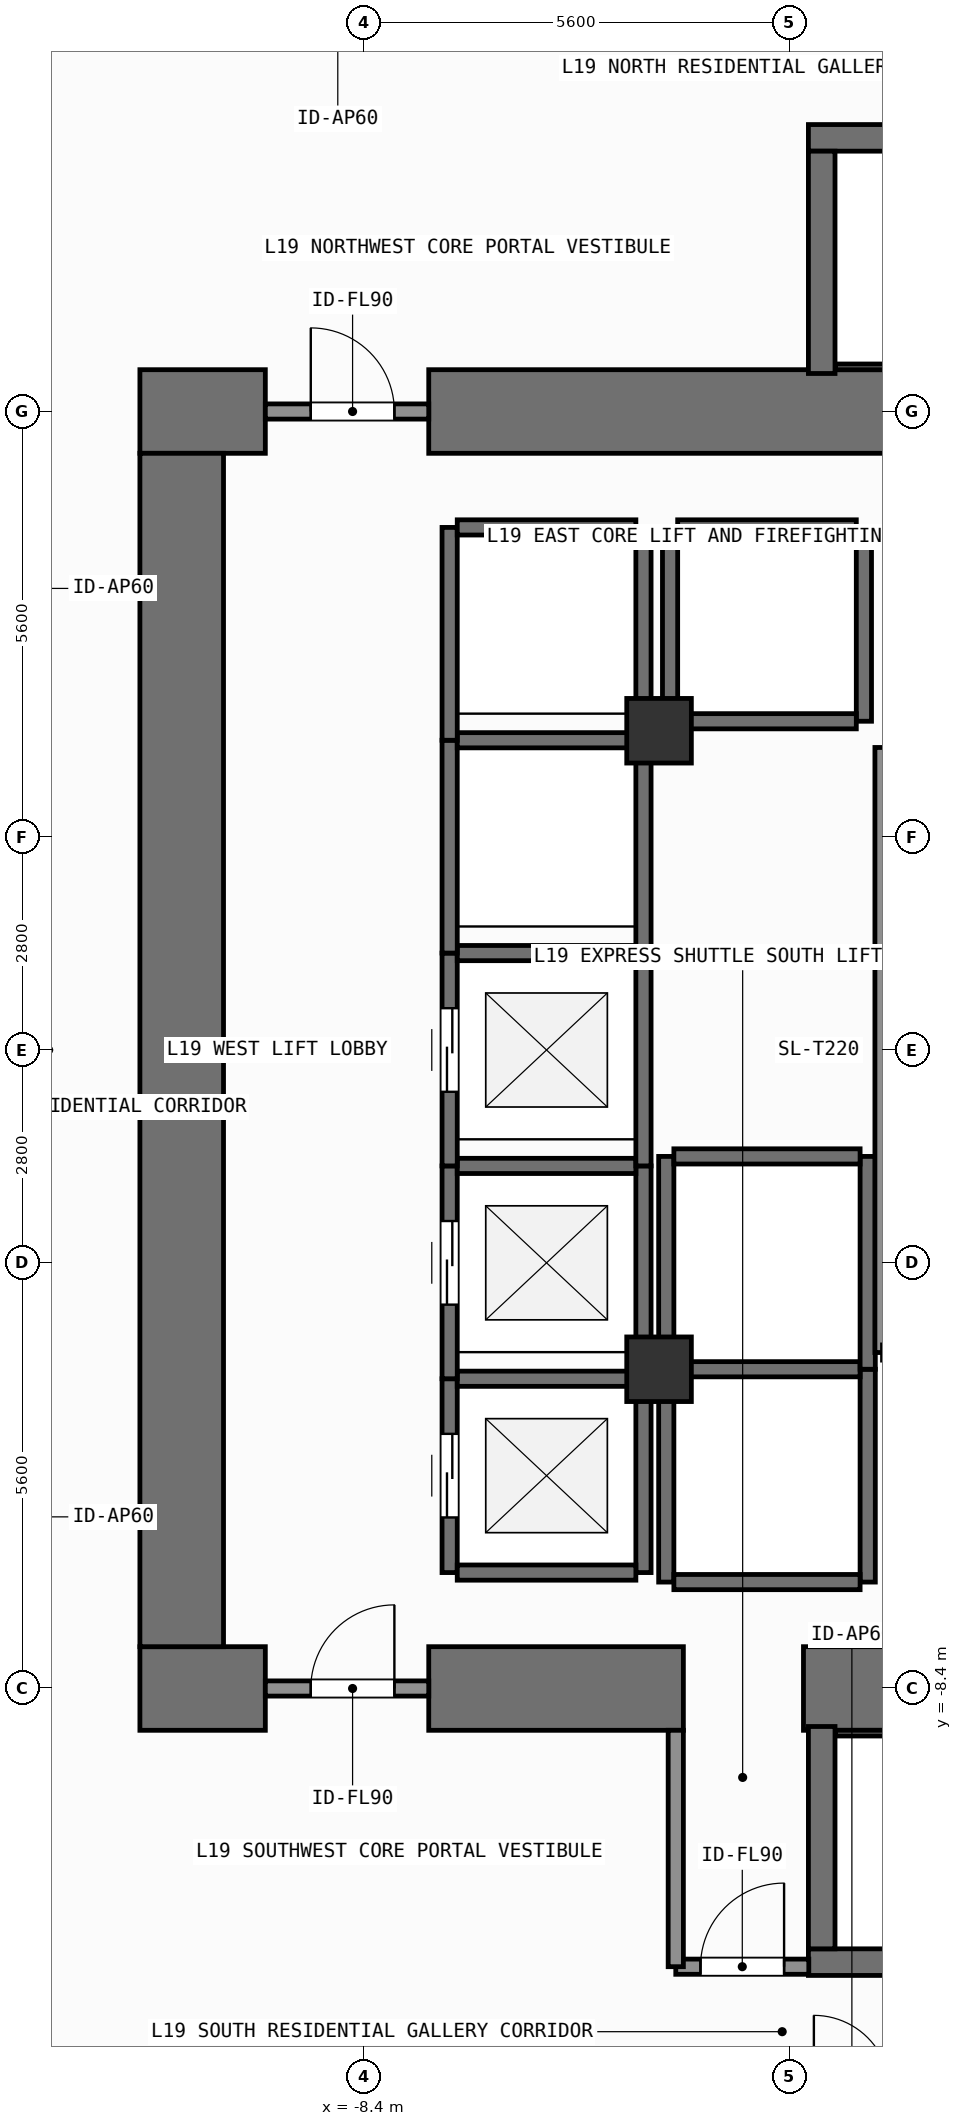
"""IFC4 building model, lengths in metres.
Left out: names, types, materials, properties, quantities, classifications, styles, units other than length and angle.
Written with IfcOpenShell. Run it as: python <this file> out.ifc"""

import sys

from ifc_helpers import new_model, si_unit, direction, frame, frame_2d, origin, origin_2d, place, context, subcontext, project, spatial, rectangle, extrude, element, fill, save


model = new_model("IFC4")
c1 = context("Model", 3, precision=1e-05, world=origin(), true_north=direction((0.0, 1.0)))
c2 = subcontext(c1, "Body", "Model", "MODEL_VIEW")
j1 = project(units=[si_unit("LENGTHUNIT", "METRE"), si_unit("PLANEANGLEUNIT", "RADIAN")], contexts=[c1])
p1 = place(None, origin())
s1 = spatial("IfcSite", under=j1, at=p1, CompositionType="ELEMENT")
p2 = place(p1, origin())
s2 = spatial("IfcBuilding", under=s1, at=p2, CompositionType="ELEMENT")
p3 = place(p2, frame((0.0, 0.0, 73.5)))
s3 = spatial("IfcBuildingStorey", under=s2, at=p3, CompositionType="ELEMENT", Elevation=73.5)
p4 = place(p3, frame((-11.35, -8.4, 0.0), z_axis=(0.0, 0.0, 1.0), x_axis=(1.0, 0.0, 0.0)))
e1 = element("IfcWall", 1, at=p4, inside=s3, PredefinedType="SHEAR", context=c2, shape_type="SweptSolid", body=[
    extrude(rectangle(XDim=1.65, YDim=1.1, at=frame_2d((0.825, 0.0))), origin(), (0.0, 0.0, 1.0), 3.9),
])
p5 = place(p3, frame((-7.55, -8.4, 0.0), z_axis=(0.0, 0.0, 1.0), x_axis=(1.0, 0.0, 0.0)))
e2 = element("IfcWall", 2, at=p5, inside=s3, PredefinedType="SHEAR", context=c2, shape_type="SweptSolid", body=[
    extrude(rectangle(XDim=3.35, YDim=1.1, at=frame_2d((1.675, 0.0))), origin(), (0.0, 0.0, 1.0), 3.9),
])
p6 = place(p3, frame((-2.62, -8.4, 0.0), z_axis=(0.0, 0.0, 1.0), x_axis=(1.0, 0.0, 0.0)))
e3 = element("IfcWall", 3, at=p6, inside=s3, PredefinedType="SHEAR", context=c2, shape_type="SweptSolid", body=[
    extrude(rectangle(XDim=7.27, YDim=1.1, at=frame_2d((3.635, 0.0))), origin(), (0.0, 0.0, 1.0), 3.9),
])
p7 = place(p3, frame((-11.35, 8.4, 0.0), z_axis=(0.0, 0.0, 1.0), x_axis=(1.0, 0.0, 0.0)))
e4 = element("IfcWall", 4, at=p7, inside=s3, PredefinedType="SHEAR", context=c2, shape_type="SweptSolid", body=[
    extrude(rectangle(XDim=1.65, YDim=1.1, at=frame_2d((0.825, 0.0))), origin(), (0.0, 0.0, 1.0), 3.9),
])
p8 = place(p3, frame((-7.55, 8.4, 0.0), z_axis=(0.0, 0.0, 1.0), x_axis=(1.0, 0.0, 0.0)))
e5 = element("IfcWall", 5, at=p8, inside=s3, PredefinedType="SHEAR", context=c2, shape_type="SweptSolid", body=[
    extrude(rectangle(XDim=16.5, YDim=1.1, at=frame_2d((8.25, 0.0))), origin(), (0.0, 0.0, 1.0), 3.9),
])
p9 = place(p3, frame((-10.8, -7.85, 0.0), z_axis=(0.0, 0.0, 1.0), x_axis=(0.0, 1.0, 0.0)))
e6 = element("IfcWall", 6, at=p9, inside=s3, PredefinedType="SHEAR", context=c2, shape_type="SweptSolid", body=[
    extrude(rectangle(XDim=15.7, YDim=1.1, at=frame_2d((7.85, 0.0))), origin(), (0.0, 0.0, 1.0), 3.9),
])
p10 = place(p3, frame((-2.555, -12.0, 0.0), z_axis=(0.0, 0.0, 1.0), x_axis=(1.0, 0.0, 0.0)))
e7 = element("IfcWall", 7, at=p10, inside=s3, PredefinedType="SHEAR", context=c2, shape_type="SweptSolid", body=[
    extrude(rectangle(XDim=7.31, YDim=0.35, at=frame_2d((3.655, 0.0))), origin(), (0.0, 0.0, 1.0), 3.9),
])
p11 = place(p3, frame((-2.2, -8.988, 0.0), z_axis=(0.0, 0.0, 1.0), x_axis=(1.0, 0.0, 0.0)))
e8 = element("IfcWall", 8, at=p11, inside=s3, PredefinedType="SHEAR", context=c2, shape_type="SweptSolid", body=[
    extrude(rectangle(XDim=6.6, YDim=0.075, at=frame_2d((3.3, 0.0))), origin(), (0.0, 0.0, 1.0), 3.9),
])
p12 = place(p3, frame((-2.38, -11.825, 0.0), z_axis=(0.0, 0.0, 1.0), x_axis=(0.0, 1.0, 0.0)))
e9 = element("IfcWall", 9, at=p12, inside=s3, PredefinedType="SHEAR", context=c2, shape_type="SweptSolid", body=[
    extrude(rectangle(XDim=2.925, YDim=0.35, at=frame_2d((1.462, 0.0))), origin(), (0.0, 0.0, 1.0), 3.9),
])
p13 = place(p3, frame((-2.555, 12.0, 0.0), z_axis=(0.0, 0.0, 1.0), x_axis=(1.0, 0.0, 0.0)))
e10 = element("IfcWall", 10, at=p13, inside=s3, PredefinedType="SHEAR", context=c2, shape_type="SweptSolid", body=[
    extrude(rectangle(XDim=7.31, YDim=0.35, at=frame_2d((3.655, 0.0))), origin(), (0.0, 0.0, 1.0), 3.9),
])
p14 = place(p3, frame((-2.2, 8.988, 0.0), z_axis=(0.0, 0.0, 1.0), x_axis=(1.0, 0.0, 0.0)))
e11 = element("IfcWall", 11, at=p14, inside=s3, PredefinedType="SHEAR", context=c2, shape_type="SweptSolid", body=[
    extrude(rectangle(XDim=6.6, YDim=0.075, at=frame_2d((3.3, 0.0))), origin(), (0.0, 0.0, 1.0), 3.9),
])
p15 = place(p3, frame((-2.38, 8.9, 0.0), z_axis=(0.0, 0.0, 1.0), x_axis=(0.0, 1.0, 0.0)))
e12 = element("IfcWall", 12, at=p15, inside=s3, PredefinedType="SHEAR", context=c2, shape_type="SweptSolid", body=[
    extrude(rectangle(XDim=2.925, YDim=0.35, at=frame_2d((1.462, 0.0))), origin(), (0.0, 0.0, 1.0), 3.9),
])
for number, where, z_axis, x_axis in (
    (13, (-4.52, -4.2, 0.0), (0.0, 0.0, 1.0), (1.0, 0.0, 0.0)),
    (14, (-4.52, 4.2, 0.0), (0.0, 0.0, 1.0), (1.0, 0.0, 0.0)),
):
    element("IfcColumn", number, at=place(p3, frame(where, z_axis=z_axis, x_axis=x_axis)), inside=s3, PredefinedType="COLUMN", context=c2, shape_type="SweptSolid", body=[
        extrude(rectangle(XDim=0.85, YDim=0.85, at=origin_2d()), origin(), (0.0, 0.0, 1.0), 3.9),
    ])
p16 = place(p3, frame((-7.275, -6.875, 0.0), z_axis=(0.0, 0.0, 1.0), x_axis=(0.0, 1.0, 0.0)))
e15 = element("IfcWall", 15, at=p16, inside=s3, PredefinedType="SHEAR", context=c2, shape_type="SweptSolid", body=[
    extrude(rectangle(XDim=2.55, YDim=0.2, at=frame_2d((1.275, 0.0))), origin(), (0.0, 0.0, 1.0), 3.6),
])
p17 = place(p16, frame((0.725, 0.0, 0.0)))
e16 = element("IfcOpeningElement", 16, at=p17, cuts=e15, PredefinedType="OPENING", context=c2, shape_type="SweptSolid", body=[
    extrude(rectangle(XDim=1.1, YDim=2.2, at=frame_2d((0.55, 1.1))), frame((0.0, 0.11, 0.0), z_axis=(0.0, -1.0, 0.0), x_axis=(1.0, 0.0, 0.0)), (0.0, 0.0, 1.0), 0.22),
])
p18 = place(p3, frame((-4.725, -6.875, 0.0), z_axis=(0.0, 0.0, 1.0), x_axis=(0.0, 1.0, 0.0)))
e17 = element("IfcWall", 17, at=p18, inside=s3, PredefinedType="SHEAR", context=c2, shape_type="SweptSolid", body=[
    extrude(rectangle(XDim=2.55, YDim=0.2, at=frame_2d((1.275, 0.0))), origin(), (0.0, 0.0, 1.0), 3.6),
])
for number, where, z_axis, x_axis in (
    (18, (-7.175, -6.875, 0.0), (0.0, 0.0, 1.0), (1.0, 0.0, 0.0)),
    (19, (-7.175, -4.325, 0.0), (0.0, 0.0, 1.0), (1.0, 0.0, 0.0)),
):
    element("IfcWall", number, at=place(p3, frame(where, z_axis=z_axis, x_axis=x_axis)), inside=s3, PredefinedType="SHEAR", context=c2, shape_type="SweptSolid", body=[
        extrude(rectangle(XDim=2.35, YDim=0.2, at=frame_2d((1.175, 0.0))), origin(), (0.0, 0.0, 1.0), 3.6),
    ])
p19 = place(p3, frame((-7.275, -4.325, 0.0), z_axis=(0.0, 0.0, 1.0), x_axis=(0.0, 1.0, 0.0)))
e20 = element("IfcWall", 20, at=p19, inside=s3, PredefinedType="SHEAR", context=c2, shape_type="SweptSolid", body=[
    extrude(rectangle(XDim=2.8, YDim=0.2, at=frame_2d((1.4, 0.0))), origin(), (0.0, 0.0, 1.0), 3.6),
])
p20 = place(p19, frame((0.975, 0.0, 0.0)))
e21 = element("IfcOpeningElement", 21, at=p20, cuts=e20, PredefinedType="OPENING", context=c2, shape_type="SweptSolid", body=[
    extrude(rectangle(XDim=1.1, YDim=2.2, at=frame_2d((0.55, 1.1))), frame((0.0, 0.11, 0.0), z_axis=(0.0, -1.0, 0.0), x_axis=(1.0, 0.0, 0.0)), (0.0, 0.0, 1.0), 0.22),
])
p21 = place(p3, frame((-4.725, -4.325, 0.0), z_axis=(0.0, 0.0, 1.0), x_axis=(0.0, 1.0, 0.0)))
e22 = element("IfcWall", 22, at=p21, inside=s3, PredefinedType="SHEAR", context=c2, shape_type="SweptSolid", body=[
    extrude(rectangle(XDim=2.8, YDim=0.2, at=frame_2d((1.4, 0.0))), origin(), (0.0, 0.0, 1.0), 3.6),
])
p22 = place(p3, frame((-7.175, -1.525, 0.0), z_axis=(0.0, 0.0, 1.0), x_axis=(1.0, 0.0, 0.0)))
e23 = element("IfcWall", 23, at=p22, inside=s3, PredefinedType="SHEAR", context=c2, shape_type="SweptSolid", body=[
    extrude(rectangle(XDim=2.35, YDim=0.2, at=frame_2d((1.175, 0.0))), origin(), (0.0, 0.0, 1.0), 3.6),
])
p23 = place(p3, frame((-7.275, -1.525, 0.0), z_axis=(0.0, 0.0, 1.0), x_axis=(0.0, 1.0, 0.0)))
e24 = element("IfcWall", 24, at=p23, inside=s3, PredefinedType="SHEAR", context=c2, shape_type="SweptSolid", body=[
    extrude(rectangle(XDim=2.8, YDim=0.2, at=frame_2d((1.4, 0.0))), origin(), (0.0, 0.0, 1.0), 3.6),
])
p24 = place(p23, frame((0.975, 0.0, 0.0)))
e25 = element("IfcOpeningElement", 25, at=p24, cuts=e24, PredefinedType="OPENING", context=c2, shape_type="SweptSolid", body=[
    extrude(rectangle(XDim=1.1, YDim=2.2, at=frame_2d((0.55, 1.1))), frame((0.0, 0.11, 0.0), z_axis=(0.0, -1.0, 0.0), x_axis=(1.0, 0.0, 0.0)), (0.0, 0.0, 1.0), 0.22),
])
p25 = place(p3, frame((-4.725, -1.525, 0.0), z_axis=(0.0, 0.0, 1.0), x_axis=(0.0, 1.0, 0.0)))
e26 = element("IfcWall", 26, at=p25, inside=s3, PredefinedType="SHEAR", context=c2, shape_type="SweptSolid", body=[
    extrude(rectangle(XDim=2.8, YDim=0.2, at=frame_2d((1.4, 0.0))), origin(), (0.0, 0.0, 1.0), 3.6),
])
p26 = place(p3, frame((-7.175, 1.275, 0.0), z_axis=(0.0, 0.0, 1.0), x_axis=(1.0, 0.0, 0.0)))
e27 = element("IfcWall", 27, at=p26, inside=s3, PredefinedType="SHEAR", context=c2, shape_type="SweptSolid", body=[
    extrude(rectangle(XDim=2.35, YDim=0.2, at=frame_2d((1.175, 0.0))), origin(), (0.0, 0.0, 1.0), 3.6),
])
for number, where, z_axis, x_axis in (
    (28, (-7.275, 1.275, 0.0), (0.0, 0.0, 1.0), (0.0, 1.0, 0.0)),
    (29, (-4.725, 1.275, 0.0), (0.0, 0.0, 1.0), (0.0, 1.0, 0.0)),
):
    element("IfcWall", number, at=place(p3, frame(where, z_axis=z_axis, x_axis=x_axis)), inside=s3, PredefinedType="SHEAR", context=c2, shape_type="SweptSolid", body=[
        extrude(rectangle(XDim=2.8, YDim=0.2, at=frame_2d((1.4, 0.0))), origin(), (0.0, 0.0, 1.0), 3.6),
    ])
p27 = place(p3, frame((-7.175, 4.075, 0.0), z_axis=(0.0, 0.0, 1.0), x_axis=(1.0, 0.0, 0.0)))
e30 = element("IfcWall", 30, at=p27, inside=s3, PredefinedType="SHEAR", context=c2, shape_type="SweptSolid", body=[
    extrude(rectangle(XDim=2.35, YDim=0.2, at=frame_2d((1.175, 0.0))), origin(), (0.0, 0.0, 1.0), 3.6),
])
for number, where, z_axis, x_axis in (
    (31, (-7.275, 4.075, 0.0), (0.0, 0.0, 1.0), (0.0, 1.0, 0.0)),
    (32, (-4.725, 4.075, 0.0), (0.0, 0.0, 1.0), (0.0, 1.0, 0.0)),
):
    element("IfcWall", number, at=place(p3, frame(where, z_axis=z_axis, x_axis=x_axis)), inside=s3, PredefinedType="SHEAR", context=c2, shape_type="SweptSolid", body=[
        extrude(rectangle(XDim=2.8, YDim=0.2, at=frame_2d((1.4, 0.0))), origin(), (0.0, 0.0, 1.0), 3.6),
    ])
p28 = place(p3, frame((-7.175, 6.875, 0.0), z_axis=(0.0, 0.0, 1.0), x_axis=(1.0, 0.0, 0.0)))
e33 = element("IfcWall", 33, at=p28, inside=s3, PredefinedType="SHEAR", context=c2, shape_type="SweptSolid", body=[
    extrude(rectangle(XDim=2.35, YDim=0.2, at=frame_2d((1.175, 0.0))), origin(), (0.0, 0.0, 1.0), 3.6),
])
for number, where, z_axis, x_axis in (
    (34, (-4.375, 4.325, 0.0), (0.0, 0.0, 1.0), (0.0, 1.0, 0.0)),
    (35, (-1.825, 4.325, 0.0), (0.0, 0.0, 1.0), (0.0, 1.0, 0.0)),
):
    element("IfcWall", number, at=place(p3, frame(where, z_axis=z_axis, x_axis=x_axis)), inside=s3, PredefinedType="SHEAR", context=c2, shape_type="SweptSolid", body=[
        extrude(rectangle(XDim=2.55, YDim=0.2, at=frame_2d((1.275, 0.0))), origin(), (0.0, 0.0, 1.0), 3.6),
    ])
for number, where, z_axis, x_axis in (
    (36, (-4.275, 4.325, 0.0), (0.0, 0.0, 1.0), (1.0, 0.0, 0.0)),
    (37, (-4.275, 6.875, 0.0), (0.0, 0.0, 1.0), (1.0, 0.0, 0.0)),
):
    element("IfcWall", number, at=place(p3, frame(where, z_axis=z_axis, x_axis=x_axis)), inside=s3, PredefinedType="SHEAR", context=c2, shape_type="SweptSolid", body=[
        extrude(rectangle(XDim=2.35, YDim=0.2, at=frame_2d((1.175, 0.0))), origin(), (0.0, 0.0, 1.0), 3.6),
    ])
for number, where, z_axis, x_axis in (
    (38, (-4.425, -7.0, 0.0), (0.0, 0.0, 1.0), (0.0, 1.0, 0.0)),
    (39, (-1.775, -7.0, 0.0), (0.0, 0.0, 1.0), (0.0, 1.0, 0.0)),
):
    element("IfcWall", number, at=place(p3, frame(where, z_axis=z_axis, x_axis=x_axis)), inside=s3, PredefinedType="SHEAR", context=c2, shape_type="SweptSolid", body=[
        extrude(rectangle(XDim=2.8, YDim=0.2, at=frame_2d((1.4, 0.0))), origin(), (0.0, 0.0, 1.0), 3.6),
    ])
for number, where, z_axis, x_axis in (
    (40, (-4.325, -7.0, 0.0), (0.0, 0.0, 1.0), (1.0, 0.0, 0.0)),
    (41, (-4.325, -4.2, 0.0), (0.0, 0.0, 1.0), (1.0, 0.0, 0.0)),
):
    element("IfcWall", number, at=place(p3, frame(where, z_axis=z_axis, x_axis=x_axis)), inside=s3, PredefinedType="SHEAR", context=c2, shape_type="SweptSolid", body=[
        extrude(rectangle(XDim=2.45, YDim=0.2, at=frame_2d((1.225, 0.0))), origin(), (0.0, 0.0, 1.0), 3.6),
    ])
for number, where, z_axis, x_axis in (
    (42, (-4.425, -4.2, 0.0), (0.0, 0.0, 1.0), (0.0, 1.0, 0.0)),
    (43, (-1.775, -4.2, 0.0), (0.0, 0.0, 1.0), (0.0, 1.0, 0.0)),
):
    element("IfcWall", number, at=place(p3, frame(where, z_axis=z_axis, x_axis=x_axis)), inside=s3, PredefinedType="SHEAR", context=c2, shape_type="SweptSolid", body=[
        extrude(rectangle(XDim=2.8, YDim=0.2, at=frame_2d((1.4, 0.0))), origin(), (0.0, 0.0, 1.0), 3.6),
    ])
p29 = place(p3, frame((-4.325, -1.4, 0.0), z_axis=(0.0, 0.0, 1.0), x_axis=(1.0, 0.0, 0.0)))
e44 = element("IfcWall", 44, at=p29, inside=s3, PredefinedType="SHEAR", context=c2, shape_type="SweptSolid", body=[
    extrude(rectangle(XDim=2.45, YDim=0.2, at=frame_2d((1.225, 0.0))), origin(), (0.0, 0.0, 1.0), 3.6),
])
p30 = place(p3, frame((-9.7, -8.4, 0.0), z_axis=(0.0, 0.0, 1.0), x_axis=(1.0, 0.0, 0.0)))
e45 = element("IfcWall", 45, at=p30, inside=s3, PredefinedType="SOLIDWALL", context=c2, shape_type="SweptSolid", body=[
    extrude(rectangle(XDim=2.15, YDim=0.2, at=frame_2d((1.075, 0.0))), origin(), (0.0, 0.0, 1.0), 2.64),
])
p31 = place(p30, frame((0.598, 0.0, 0.0)))
e46 = element("IfcOpeningElement", 46, at=p31, cuts=e45, PredefinedType="OPENING", context=c2, shape_type="SweptSolid", body=[
    extrude(rectangle(XDim=1.1, YDim=2.15, at=frame_2d((0.55, 1.075))), frame((0.0, 0.11, 0.0), z_axis=(0.0, -1.0, 0.0), x_axis=(1.0, 0.0, 0.0)), (0.0, 0.0, 1.0), 0.22),
])
p32 = place(p3, frame((-9.7, 8.4, 0.0), z_axis=(0.0, 0.0, 1.0), x_axis=(1.0, 0.0, 0.0)))
e47 = element("IfcWall", 47, at=p32, inside=s3, PredefinedType="SOLIDWALL", context=c2, shape_type="SweptSolid", body=[
    extrude(rectangle(XDim=2.15, YDim=0.2, at=frame_2d((1.075, 0.0))), origin(), (0.0, 0.0, 1.0), 2.64),
])
p33 = place(p32, frame((0.598, 0.0, 0.0)))
e48 = element("IfcOpeningElement", 48, at=p33, cuts=e47, PredefinedType="OPENING", context=c2, shape_type="SweptSolid", body=[
    extrude(rectangle(XDim=1.1, YDim=2.15, at=frame_2d((0.55, 1.075))), frame((0.0, 0.11, 0.0), z_axis=(0.0, -1.0, 0.0), x_axis=(1.0, 0.0, 0.0)), (0.0, 0.0, 1.0), 0.22),
])
p34 = place(p3, frame((-4.3, -12.06, 0.0), z_axis=(0.0, 0.0, 1.0), x_axis=(1.0, 0.0, 0.0)))
e49 = element("IfcWall", 49, at=p34, inside=s3, PredefinedType="SOLIDWALL", context=c2, shape_type="SweptSolid", body=[
    extrude(rectangle(XDim=1.75, YDim=0.2, at=frame_2d((0.875, 0.0))), origin(), (0.0, 0.0, 1.0), 3.6),
])
p35 = place(p34, frame((0.325, 0.0, 0.0)))
e50 = element("IfcOpeningElement", 50, at=p35, cuts=e49, PredefinedType="OPENING", context=c2, shape_type="SweptSolid", body=[
    extrude(rectangle(XDim=1.1, YDim=2.15, at=frame_2d((0.55, 1.075))), frame((0.0, 0.11, 0.0), z_axis=(0.0, -1.0, 0.0), x_axis=(1.0, 0.0, 0.0)), (0.0, 0.0, 1.0), 0.22),
])
p36 = place(p3, frame((-4.3, -12.06, 0.0), z_axis=(0.0, 0.0, 1.0), x_axis=(0.0, 1.0, 0.0)))
e51 = element("IfcWall", 51, at=p36, inside=s3, PredefinedType="SOLIDWALL", context=c2, shape_type="SweptSolid", body=[
    extrude(rectangle(XDim=3.11, YDim=0.2, at=frame_2d((1.555, 0.0))), origin(), (0.0, 0.0, 1.0), 3.6),
])
p37 = place(p3, frame((-1.58, -3.98, 0.0), z_axis=(0.0, 0.0, 1.0), x_axis=(0.0, 1.0, 0.0)))
e52 = element("IfcWall", 52, at=p37, inside=s3, PredefinedType="SOLIDWALL", context=c2, shape_type="SweptSolid", body=[
    extrude(rectangle(XDim=7.96, YDim=0.2, at=frame_2d((3.98, 0.0))), origin(), (0.0, 0.0, 1.0), 3.6),
])
p38 = place(p17, origin())
e53 = element("IfcDoor", 53, at=p38, inside=s3, OperationType="SLIDING_TO_LEFT", PredefinedType="DOOR", context=c2, shape_type="SweptSolid", body=[
    extrude(rectangle(XDim=1.1, YDim=2.2, at=frame_2d((0.55, 1.1))), frame((0.0, 0.025, 0.0), z_axis=(0.0, -1.0, 0.0), x_axis=(1.0, 0.0, 0.0)), (0.0, 0.0, 1.0), 0.05),
])
fill(e16, e53)
p39 = place(p20, origin())
e54 = element("IfcDoor", 54, at=p39, inside=s3, OperationType="SLIDING_TO_LEFT", PredefinedType="DOOR", context=c2, shape_type="SweptSolid", body=[
    extrude(rectangle(XDim=1.1, YDim=2.2, at=frame_2d((0.55, 1.1))), frame((0.0, 0.025, 0.0), z_axis=(0.0, -1.0, 0.0), x_axis=(1.0, 0.0, 0.0)), (0.0, 0.0, 1.0), 0.05),
])
fill(e21, e54)
p40 = place(p24, origin())
e55 = element("IfcDoor", 55, at=p40, inside=s3, OperationType="SLIDING_TO_LEFT", PredefinedType="DOOR", context=c2, shape_type="SweptSolid", body=[
    extrude(rectangle(XDim=1.1, YDim=2.2, at=frame_2d((0.55, 1.1))), frame((0.0, 0.025, 0.0), z_axis=(0.0, -1.0, 0.0), x_axis=(1.0, 0.0, 0.0)), (0.0, 0.0, 1.0), 0.05),
])
fill(e25, e55)
p41 = place(p31, origin())
e56 = element("IfcDoor", 56, at=p41, inside=s3, OperationType="SINGLE_SWING_RIGHT", PredefinedType="DOOR", context=c2, shape_type="SweptSolid", body=[
    extrude(rectangle(XDim=1.1, YDim=2.15, at=frame_2d((0.55, 1.075))), frame((0.0, 0.025, 0.0), z_axis=(0.0, -1.0, 0.0), x_axis=(1.0, 0.0, 0.0)), (0.0, 0.0, 1.0), 0.05),
])
fill(e46, e56)
p42 = place(p33, origin())
e57 = element("IfcDoor", 57, at=p42, inside=s3, OperationType="SINGLE_SWING_LEFT", PredefinedType="DOOR", context=c2, shape_type="SweptSolid", body=[
    extrude(rectangle(XDim=1.1, YDim=2.15, at=frame_2d((0.55, 1.075))), frame((0.0, 0.025, 0.0), z_axis=(0.0, -1.0, 0.0), x_axis=(1.0, 0.0, 0.0)), (0.0, 0.0, 1.0), 0.05),
])
fill(e48, e57)
p43 = place(p35, origin())
e58 = element("IfcDoor", 58, at=p43, inside=s3, OperationType="SINGLE_SWING_RIGHT", PredefinedType="DOOR", context=c2, shape_type="SweptSolid", body=[
    extrude(rectangle(XDim=1.1, YDim=2.15, at=frame_2d((0.55, 1.075))), frame((0.0, 0.025, 0.0), z_axis=(0.0, -1.0, 0.0), x_axis=(1.0, 0.0, 0.0)), (0.0, 0.0, 1.0), 0.05),
])
fill(e50, e58)
save(model, sys.argv[1])
